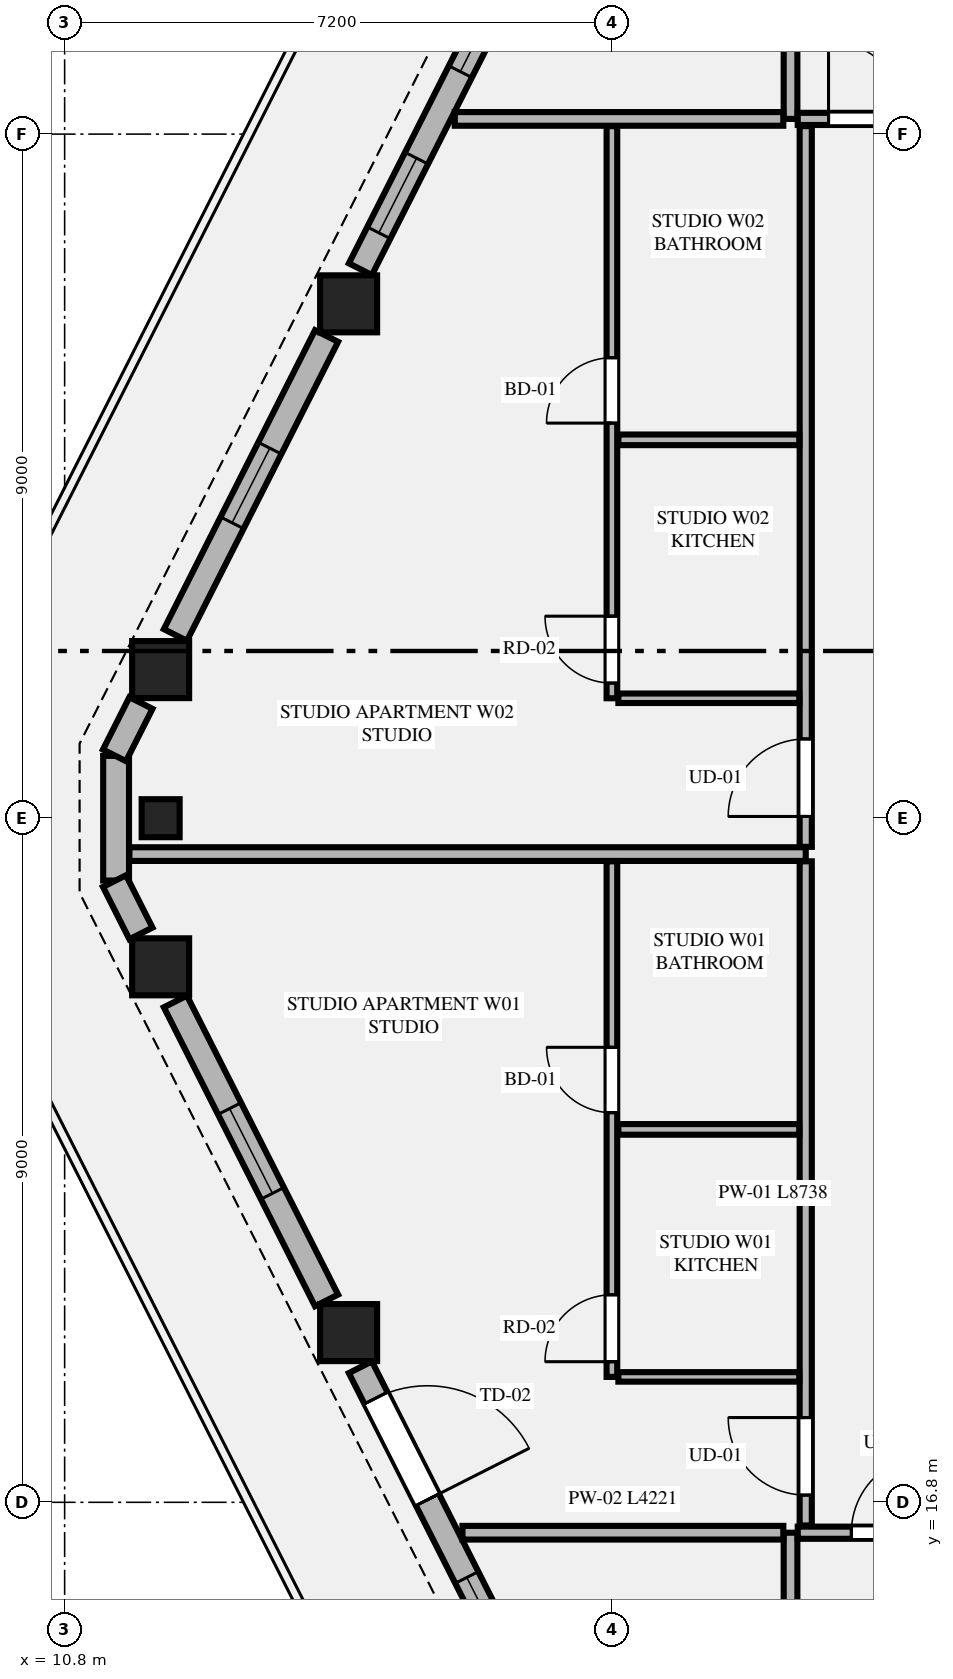
"""IFC4 building model, lengths in metres.
Left out: names, types, materials, properties, quantities, classifications, styles, units other than length and angle.
Written with IfcOpenShell. Run it as: python <this file> out.ifc"""

import sys

from ifc_helpers import new_model, si_unit, direction, frame, frame_2d, origin, origin_2d, place, context, subcontext, project, spatial, rectangle, extrude, element, fill, save


model = new_model("IFC4")
c1 = context("Model", 3, precision=1e-05, world=origin(), true_north=direction((0.0, 1.0)))
c2 = subcontext(c1, "Body", "Model", "MODEL_VIEW")
j1 = project(units=[si_unit("LENGTHUNIT", "METRE"), si_unit("PLANEANGLEUNIT", "RADIAN")], contexts=[c1])
p1 = place(None, origin())
s1 = spatial("IfcSite", under=j1, at=p1, CompositionType="ELEMENT")
p2 = place(p1, origin())
s2 = spatial("IfcBuilding", under=s1, at=p2, CompositionType="ELEMENT")
p3 = place(p2, frame((0.0, 0.0, 227.0)))
s3 = spatial("IfcBuildingStorey", under=s2, at=p3, CompositionType="ELEMENT", Elevation=227.0)
for number, where, z_axis, x_axis in (
    (1, (14.536, 32.567, 0.0), (0.0, 0.0, 1.0), (1.0, 0.0, 0.0)),
    (2, (12.063, 27.755, 0.0), (0.0, 0.0, 1.0), (1.0, 0.0, 0.0)),
    (3, (12.063, 23.845, 0.0), (0.0, 0.0, 1.0), (1.0, 0.0, 0.0)),
    (4, (14.536, 19.033, 0.0), (0.0, 0.0, 1.0), (1.0, 0.0, 0.0)),
):
    element("IfcColumn", number, at=place(p3, frame(where, z_axis=z_axis, x_axis=x_axis)), inside=s3, PredefinedType="COLUMN", context=c2, shape_type="SweptSolid", body=[
        extrude(rectangle(XDim=0.75, YDim=0.75, at=origin_2d()), origin(), (0.0, 0.0, 1.0), 3.65),
    ])
p4 = place(p3, frame((12.063, 25.8, 0.0), z_axis=(0.0, 0.0, 1.0), x_axis=(0.0, -1.0, 0.0)))
e5 = element("IfcColumn", 5, at=p4, inside=s3, PredefinedType="PILASTER", context=c2, shape_type="SweptSolid", body=[
    extrude(rectangle(XDim=0.5, YDim=0.35, at=origin_2d()), origin(), (0.0, 0.0, 1.0), 3.65),
])
p5 = place(p3, frame((11.477, 26.62, 0.0), z_axis=(0.0, 0.0, 1.0), x_axis=(0.0, -1.0, 0.0)))
e6 = element("IfcWall", 6, at=p5, inside=s3, PredefinedType="STANDARD", context=c2, shape_type="SweptSolid", body=[
    extrude(rectangle(XDim=1.64, YDim=0.34, at=frame_2d((0.82, 0.0))), origin(), (0.0, 0.0, 1.0), 3.45),
])
p6 = place(p3, frame((16.768, 37.127, 0.0), z_axis=(0.0, 0.0, 1.0), x_axis=(-0.451581819983, -0.892229712496, 0.0)))
e7 = element("IfcWall", 7, at=p6, inside=s3, PredefinedType="STANDARD", context=c2, shape_type="SweptSolid", body=[
    extrude(rectangle(XDim=4.6, YDim=0.34, at=frame_2d((2.3, 0.0))), origin(), (0.0, 0.0, 1.0), 2.983),
])
p7 = place(p6, frame((0.437, 0.0, 0.75)))
e8 = element("IfcOpeningElement", 8, at=p7, cuts=e7, PredefinedType="OPENING", context=c2, shape_type="SweptSolid", body=[
    extrude(rectangle(XDim=1.25, YDim=1.95, at=frame_2d((0.625, 0.975))), frame((0.0, 0.18, 0.0), z_axis=(0.0, -1.0, 0.0), x_axis=(1.0, 0.0, 0.0)), (0.0, 0.0, 1.0), 0.36),
])
p8 = place(p6, frame((2.963, 0.0, 0.75)))
e9 = element("IfcOpeningElement", 9, at=p8, cuts=e7, PredefinedType="OPENING", context=c2, shape_type="SweptSolid", body=[
    extrude(rectangle(XDim=1.1, YDim=2.0, at=frame_2d((0.55, 1.0))), frame((0.0, 0.18, 0.0), z_axis=(0.0, -1.0, 0.0), x_axis=(1.0, 0.0, 0.0)), (0.0, 0.0, 1.0), 0.36),
])
p9 = place(p3, frame((14.246, 32.144, 0.0), z_axis=(0.0, 0.0, 1.0), x_axis=(-0.451285866323, -0.892379441077, 0.0)))
e10 = element("IfcWall", 10, at=p9, inside=s3, PredefinedType="STANDARD", context=c2, shape_type="SweptSolid", body=[
    extrude(rectangle(XDim=4.407, YDim=0.34, at=frame_2d((2.204, 0.0))), origin(), (0.0, 0.0, 1.0), 2.983),
])
p10 = place(p9, frame((1.654, 0.0, 0.75)))
e11 = element("IfcOpeningElement", 11, at=p10, cuts=e10, PredefinedType="OPENING", context=c2, shape_type="SweptSolid", body=[
    extrude(rectangle(XDim=1.1, YDim=2.0, at=frame_2d((0.55, 1.0))), frame((0.0, 0.18, 0.0), z_axis=(0.0, -1.0, 0.0), x_axis=(1.0, 0.0, 0.0)), (0.0, 0.0, 1.0), 0.36),
])
for number, where, z_axis, x_axis in (
    (12, (11.804, 27.316, 0.0), (0.0, 0.0, 1.0), (-0.451, -0.893, 0.0)),
    (13, (11.456, 24.973, 0.0), (0.0, 0.0, 1.0), (0.451, -0.893, 0.0)),
):
    element("IfcWall", number, at=place(p3, frame(where, z_axis=z_axis, x_axis=x_axis)), inside=s3, PredefinedType="STANDARD", context=c2, shape_type="SweptSolid", body=[
        extrude(rectangle(XDim=0.772, YDim=0.34, at=frame_2d((0.386, 0.0))), origin(), (0.0, 0.0, 1.0), 3.45),
    ])
p11 = place(p3, frame((12.257, 23.389, 0.0), z_axis=(0.0, 0.0, 1.0), x_axis=(0.45130817501, -0.892368158984, 0.0)))
e14 = element("IfcWall", 14, at=p11, inside=s3, PredefinedType="STANDARD", context=c2, shape_type="SweptSolid", body=[
    extrude(rectangle(XDim=4.407, YDim=0.34, at=frame_2d((2.204, 0.0))), origin(), (0.0, 0.0, 1.0), 2.983),
])
p12 = place(p11, frame((1.579, 0.0, 0.75)))
e15 = element("IfcOpeningElement", 15, at=p12, cuts=e14, PredefinedType="OPENING", context=c2, shape_type="SweptSolid", body=[
    extrude(rectangle(XDim=1.25, YDim=1.95, at=frame_2d((0.625, 0.975))), frame((0.0, 0.18, 0.0), z_axis=(0.0, -1.0, 0.0), x_axis=(1.0, 0.0, 0.0)), (0.0, 0.0, 1.0), 0.36),
])
p13 = place(p3, frame((14.691, 18.577, 0.0), z_axis=(0.0, 0.0, 1.0), x_axis=(0.451581819983, -0.892229712496, 0.0)))
e16 = element("IfcWall", 16, at=p13, inside=s3, PredefinedType="STANDARD", context=c2, shape_type="SweptSolid", body=[
    extrude(rectangle(XDim=4.6, YDim=0.34, at=frame_2d((2.3, 0.0))), origin(), (0.0, 0.0, 1.0), 2.983),
])
p14 = place(p13, frame((0.454, 0.0, 0.0)))
e17 = element("IfcOpeningElement", 17, at=p14, cuts=e16, PredefinedType="OPENING", context=c2, shape_type="SweptSolid", body=[
    extrude(rectangle(XDim=1.5, YDim=2.3, at=frame_2d((0.75, 1.15))), frame((0.0, 0.18, 0.0), z_axis=(0.0, -1.0, 0.0), x_axis=(1.0, 0.0, 0.0)), (0.0, 0.0, 1.0), 0.36),
])
p15 = place(p13, frame((3.1, 0.0, 0.75)))
e18 = element("IfcOpeningElement", 18, at=p15, cuts=e16, PredefinedType="OPENING", context=c2, shape_type="SweptSolid", body=[
    extrude(rectangle(XDim=1.1, YDim=2.0, at=frame_2d((0.55, 1.0))), frame((0.0, 0.18, 0.0), z_axis=(0.0, -1.0, 0.0), x_axis=(1.0, 0.0, 0.0)), (0.0, 0.0, 1.0), 0.36),
])
p16 = place(p3, frame((20.35, 8.119, 0.0), z_axis=(0.0, 0.0, 1.0), x_axis=(0.0, 1.0, 0.0)))
e19 = element("IfcWall", 19, at=p16, inside=s3, PredefinedType="PARTITIONING", context=c2, shape_type="SweptSolid", body=[
    extrude(rectangle(XDim=8.281, YDim=0.18, at=frame_2d((4.141, 0.0))), origin(), (0.0, 0.0, 1.0), 3.45),
])
p17 = place(p3, frame((20.445, 16.4, 0.0), z_axis=(0.0, 0.0, 1.0), x_axis=(1.0, 0.0, 0.0)))
e20 = element("IfcWall", 20, at=p17, inside=s3, PredefinedType="PARTITIONING", context=c2, shape_type="SweptSolid", body=[
    extrude(rectangle(XDim=8.606, YDim=0.16, at=frame_2d((4.303, 0.0))), origin(), (0.0, 0.0, 1.0), 3.45),
])
p18 = place(p17, frame((0.705, 0.0, 0.0)))
e21 = element("IfcOpeningElement", 21, at=p18, cuts=e20, PredefinedType="OPENING", context=c2, shape_type="SweptSolid", body=[
    extrude(rectangle(XDim=1.02, YDim=2.25, at=frame_2d((0.51, 1.125))), frame((0.0, 0.09, 0.0), z_axis=(0.0, -1.0, 0.0), x_axis=(1.0, 0.0, 0.0)), (0.0, 0.0, 1.0), 0.18),
])
p19 = place(p3, frame((20.35, 35.0, 0.0), z_axis=(0.0, 0.0, 1.0), x_axis=(0.0, 1.0, 0.0)))
e22 = element("IfcWall", 22, at=p19, inside=s3, PredefinedType="PARTITIONING", context=c2, shape_type="SweptSolid", body=[
    extrude(rectangle(XDim=8.481, YDim=0.18, at=frame_2d((4.24, 0.0))), origin(), (0.0, 0.0, 1.0), 3.45),
])
p20 = place(p3, frame((20.445, 35.0, 0.0), z_axis=(0.0, 0.0, 1.0), x_axis=(1.0, 0.0, 0.0)))
e23 = element("IfcWall", 23, at=p20, inside=s3, PredefinedType="PARTITIONING", context=c2, shape_type="SweptSolid", body=[
    extrude(rectangle(XDim=15.114, YDim=0.16, at=frame_2d((7.557, 0.0))), origin(), (0.0, 0.0, 1.0), 3.45),
])
p21 = place(p20, frame((0.405, 0.0, 0.0)))
e24 = element("IfcOpeningElement", 24, at=p21, cuts=e23, PredefinedType="OPENING", context=c2, shape_type="SweptSolid", body=[
    extrude(rectangle(XDim=1.02, YDim=2.25, at=frame_2d((0.51, 1.125))), frame((0.0, 0.09, 0.0), z_axis=(0.0, -1.0, 0.0), x_axis=(1.0, 0.0, 0.0)), (0.0, 0.0, 1.0), 0.18),
])
p22 = place(p3, frame((16.034, 16.4, 0.0), z_axis=(0.0, 0.0, 1.0), x_axis=(1.0, 0.0, 0.0)))
e25 = element("IfcWall", 25, at=p22, inside=s3, PredefinedType="PARTITIONING", context=c2, shape_type="SweptSolid", body=[
    extrude(rectangle(XDim=4.221, YDim=0.18, at=frame_2d((2.11, 0.0))), origin(), (0.0, 0.0, 1.0), 3.45),
])
p23 = place(p3, frame((15.933, 35.0, 0.0), z_axis=(0.0, 0.0, 1.0), x_axis=(1.0, 0.0, 0.0)))
e26 = element("IfcWall", 26, at=p23, inside=s3, PredefinedType="PARTITIONING", context=c2, shape_type="SweptSolid", body=[
    extrude(rectangle(XDim=4.322, YDim=0.18, at=frame_2d((2.161, 0.0))), origin(), (0.0, 0.0, 1.0), 3.45),
])
p24 = place(p3, frame((20.55, 16.495, 0.0), z_axis=(0.0, 0.0, 1.0), x_axis=(0.0, 1.0, 0.0)))
e27 = element("IfcWall", 27, at=p24, inside=s3, PredefinedType="PARTITIONING", context=c2, shape_type="SweptSolid", body=[
    extrude(rectangle(XDim=8.738, YDim=0.16, at=frame_2d((4.369, 0.0))), origin(), (0.0, 0.0, 1.0), 3.137),
])
p25 = place(p24, frame((0.4, 0.0, 0.0)))
e28 = element("IfcOpeningElement", 28, at=p25, cuts=e27, PredefinedType="OPENING", context=c2, shape_type="SweptSolid", body=[
    extrude(rectangle(XDim=1.02, YDim=2.25, at=frame_2d((0.51, 1.125))), frame((0.0, 0.09, 0.0), z_axis=(0.0, -1.0, 0.0), x_axis=(1.0, 0.0, 0.0)), (0.0, 0.0, 1.0), 0.18),
])
p26 = place(p3, frame((18.085, 18.45, 0.0), z_axis=(0.0, 0.0, 1.0), x_axis=(1.0, 0.0, 0.0)))
e29 = element("IfcWall", 29, at=p26, inside=s3, PredefinedType="PARTITIONING", context=c2, shape_type="SweptSolid", body=[
    extrude(rectangle(XDim=2.38, YDim=0.125, at=frame_2d((1.19, 0.0))), origin(), (0.0, 0.0, 1.0), 3.45),
])
p27 = place(p3, frame((18.0, 18.45, 0.0), z_axis=(0.0, 0.0, 1.0), x_axis=(0.0, 1.0, 0.0)))
e30 = element("IfcWall", 30, at=p27, inside=s3, PredefinedType="PLUMBINGWALL", context=c2, shape_type="SweptSolid", body=[
    extrude(rectangle(XDim=6.783, YDim=0.14, at=frame_2d((3.392, 0.0))), origin(), (0.0, 0.0, 1.0), 3.45),
])
p28 = place(p27, frame((3.476, 0.0, 0.0)))
e31 = element("IfcOpeningElement", 31, at=p28, cuts=e30, PredefinedType="OPENING", context=c2, shape_type="SweptSolid", body=[
    extrude(rectangle(XDim=0.86, YDim=2.1, at=frame_2d((0.43, 1.05))), frame((0.0, 0.08, 0.0), z_axis=(0.0, -1.0, 0.0), x_axis=(1.0, 0.0, 0.0)), (0.0, 0.0, 1.0), 0.16),
])
p29 = place(p27, frame((0.2, 0.0, 0.0)))
e32 = element("IfcOpeningElement", 32, at=p29, cuts=e30, PredefinedType="OPENING", context=c2, shape_type="SweptSolid", body=[
    extrude(rectangle(XDim=0.88, YDim=2.15, at=frame_2d((0.44, 1.075))), frame((0.0, 0.08, 0.0), z_axis=(0.0, -1.0, 0.0), x_axis=(1.0, 0.0, 0.0)), (0.0, 0.0, 1.0), 0.16),
])
p30 = place(p3, frame((18.085, 21.706, 0.0), z_axis=(0.0, 0.0, 1.0), x_axis=(1.0, 0.0, 0.0)))
e33 = element("IfcWall", 33, at=p30, inside=s3, PredefinedType="PLUMBINGWALL", context=c2, shape_type="SweptSolid", body=[
    extrude(rectangle(XDim=2.38, YDim=0.14, at=frame_2d((1.19, 0.0))), origin(), (0.0, 0.0, 1.0), 3.45),
])
p31 = place(p3, frame((11.652, 25.328, 0.0), z_axis=(0.0, 0.0, 1.0), x_axis=(1.0, 0.0, 0.0)))
e34 = element("IfcWall", 34, at=p31, inside=s3, PredefinedType="PARTITIONING", context=c2, shape_type="SweptSolid", body=[
    extrude(rectangle(XDim=8.898, YDim=0.18, at=frame_2d((4.449, 0.0))), origin(), (0.0, 0.0, 1.0), 3.45),
])
p32 = place(p3, frame((20.55, 25.423, 0.0), z_axis=(0.0, 0.0, 1.0), x_axis=(0.0, 1.0, 0.0)))
e35 = element("IfcWall", 35, at=p32, inside=s3, PredefinedType="PARTITIONING", context=c2, shape_type="SweptSolid", body=[
    extrude(rectangle(XDim=9.482, YDim=0.16, at=frame_2d((4.741, 0.0))), origin(), (0.0, 0.0, 1.0), 3.137),
])
p33 = place(p32, frame((0.4, 0.0, 0.0)))
e36 = element("IfcOpeningElement", 36, at=p33, cuts=e35, PredefinedType="OPENING", context=c2, shape_type="SweptSolid", body=[
    extrude(rectangle(XDim=1.02, YDim=2.25, at=frame_2d((0.51, 1.125))), frame((0.0, 0.09, 0.0), z_axis=(0.0, -1.0, 0.0), x_axis=(1.0, 0.0, 0.0)), (0.0, 0.0, 1.0), 0.18),
])
p34 = place(p3, frame((18.085, 27.378, 0.0), z_axis=(0.0, 0.0, 1.0), x_axis=(1.0, 0.0, 0.0)))
e37 = element("IfcWall", 37, at=p34, inside=s3, PredefinedType="PARTITIONING", context=c2, shape_type="SweptSolid", body=[
    extrude(rectangle(XDim=2.38, YDim=0.125, at=frame_2d((1.19, 0.0))), origin(), (0.0, 0.0, 1.0), 3.45),
])
p35 = place(p3, frame((18.0, 27.378, 0.0), z_axis=(0.0, 0.0, 1.0), x_axis=(0.0, 1.0, 0.0)))
e38 = element("IfcWall", 38, at=p35, inside=s3, PredefinedType="PLUMBINGWALL", context=c2, shape_type="SweptSolid", body=[
    extrude(rectangle(XDim=7.527, YDim=0.14, at=frame_2d((3.764, 0.0))), origin(), (0.0, 0.0, 1.0), 3.45),
])
p36 = place(p35, frame((3.62, 0.0, 0.0)))
e39 = element("IfcOpeningElement", 39, at=p36, cuts=e38, PredefinedType="OPENING", context=c2, shape_type="SweptSolid", body=[
    extrude(rectangle(XDim=0.86, YDim=2.1, at=frame_2d((0.43, 1.05))), frame((0.0, 0.08, 0.0), z_axis=(0.0, -1.0, 0.0), x_axis=(1.0, 0.0, 0.0)), (0.0, 0.0, 1.0), 0.16),
])
p37 = place(p35, frame((0.2, 0.0, 0.0)))
e40 = element("IfcOpeningElement", 40, at=p37, cuts=e38, PredefinedType="OPENING", context=c2, shape_type="SweptSolid", body=[
    extrude(rectangle(XDim=0.88, YDim=2.15, at=frame_2d((0.44, 1.075))), frame((0.0, 0.08, 0.0), z_axis=(0.0, -1.0, 0.0), x_axis=(1.0, 0.0, 0.0)), (0.0, 0.0, 1.0), 0.16),
])
p38 = place(p3, frame((18.085, 30.778, 0.0), z_axis=(0.0, 0.0, 1.0), x_axis=(1.0, 0.0, 0.0)))
e41 = element("IfcWall", 41, at=p38, inside=s3, PredefinedType="PLUMBINGWALL", context=c2, shape_type="SweptSolid", body=[
    extrude(rectangle(XDim=2.38, YDim=0.14, at=frame_2d((1.19, 0.0))), origin(), (0.0, 0.0, 1.0), 3.45),
])
p39 = place(p7, origin())
e42 = element("IfcWindow", 42, at=p39, inside=s3, PartitioningType="SINGLE_PANEL", PredefinedType="WINDOW", context=c2, shape_type="SweptSolid", body=[
    extrude(rectangle(XDim=1.25, YDim=1.95, at=frame_2d((0.625, 0.975))), frame((0.0, 0.03, 0.0), z_axis=(0.0, -1.0, 0.0), x_axis=(1.0, 0.0, 0.0)), (0.0, 0.0, 1.0), 0.06),
])
fill(e8, e42)
p40 = place(p10, origin())
e43 = element("IfcWindow", 43, at=p40, inside=s3, PartitioningType="SINGLE_PANEL", PredefinedType="WINDOW", context=c2, shape_type="SweptSolid", body=[
    extrude(rectangle(XDim=1.1, YDim=2.0, at=frame_2d((0.55, 1.0))), frame((0.0, 0.03, 0.0), z_axis=(0.0, -1.0, 0.0), x_axis=(1.0, 0.0, 0.0)), (0.0, 0.0, 1.0), 0.06),
])
fill(e11, e43)
p41 = place(p12, origin())
e44 = element("IfcWindow", 44, at=p41, inside=s3, PartitioningType="SINGLE_PANEL", PredefinedType="WINDOW", context=c2, shape_type="SweptSolid", body=[
    extrude(rectangle(XDim=1.25, YDim=1.95, at=frame_2d((0.625, 0.975))), frame((0.0, 0.03, 0.0), z_axis=(0.0, -1.0, 0.0), x_axis=(1.0, 0.0, 0.0)), (0.0, 0.0, 1.0), 0.06),
])
fill(e15, e44)
p42 = place(p14, origin())
e45 = element("IfcDoor", 45, at=p42, inside=s3, OperationType="SINGLE_SWING_RIGHT", PredefinedType="DOOR", context=c2, shape_type="SweptSolid", body=[
    extrude(rectangle(XDim=1.5, YDim=2.3, at=frame_2d((0.75, 1.15))), frame((0.0, 0.025, 0.0), z_axis=(0.0, -1.0, 0.0), x_axis=(1.0, 0.0, 0.0)), (0.0, 0.0, 1.0), 0.05),
])
fill(e17, e45)
p43 = place(p18, origin())
e46 = element("IfcDoor", 46, at=p43, inside=s3, OperationType="SINGLE_SWING_RIGHT", PredefinedType="DOOR", context=c2, shape_type="SweptSolid", body=[
    extrude(rectangle(XDim=1.02, YDim=2.25, at=frame_2d((0.51, 1.125))), frame((0.0, 0.025, 0.0), z_axis=(0.0, -1.0, 0.0), x_axis=(1.0, 0.0, 0.0)), (0.0, 0.0, 1.0), 0.05),
])
fill(e21, e46)
p44 = place(p21, origin())
e47 = element("IfcDoor", 47, at=p44, inside=s3, OperationType="SINGLE_SWING_LEFT", PredefinedType="DOOR", context=c2, shape_type="SweptSolid", body=[
    extrude(rectangle(XDim=1.02, YDim=2.25, at=frame_2d((0.51, 1.125))), frame((0.0, 0.025, 0.0), z_axis=(0.0, -1.0, 0.0), x_axis=(1.0, 0.0, 0.0)), (0.0, 0.0, 1.0), 0.05),
])
fill(e24, e47)
p45 = place(p28, origin())
e48 = element("IfcDoor", 48, at=p45, inside=s3, OperationType="SINGLE_SWING_RIGHT", PredefinedType="DOOR", context=c2, shape_type="SweptSolid", body=[
    extrude(rectangle(XDim=0.86, YDim=2.1, at=frame_2d((0.43, 1.05))), frame((0.0, 0.025, 0.0), z_axis=(0.0, -1.0, 0.0), x_axis=(1.0, 0.0, 0.0)), (0.0, 0.0, 1.0), 0.05),
])
fill(e31, e48)
p46 = place(p25, origin())
e49 = element("IfcDoor", 49, at=p46, inside=s3, OperationType="SINGLE_SWING_RIGHT", PredefinedType="DOOR", context=c2, shape_type="SweptSolid", body=[
    extrude(rectangle(XDim=1.02, YDim=2.25, at=frame_2d((0.51, 1.125))), frame((0.0, 0.025, 0.0), z_axis=(0.0, -1.0, 0.0), x_axis=(1.0, 0.0, 0.0)), (0.0, 0.0, 1.0), 0.05),
])
fill(e28, e49)
p47 = place(p29, origin())
e50 = element("IfcDoor", 50, at=p47, inside=s3, OperationType="SINGLE_SWING_LEFT", PredefinedType="DOOR", context=c2, shape_type="SweptSolid", body=[
    extrude(rectangle(XDim=0.88, YDim=2.15, at=frame_2d((0.44, 1.075))), frame((0.0, 0.025, 0.0), z_axis=(0.0, -1.0, 0.0), x_axis=(1.0, 0.0, 0.0)), (0.0, 0.0, 1.0), 0.05),
])
fill(e32, e50)
p48 = place(p36, origin())
e51 = element("IfcDoor", 51, at=p48, inside=s3, OperationType="SINGLE_SWING_LEFT", PredefinedType="DOOR", context=c2, shape_type="SweptSolid", body=[
    extrude(rectangle(XDim=0.86, YDim=2.1, at=frame_2d((0.43, 1.05))), frame((0.0, 0.025, 0.0), z_axis=(0.0, -1.0, 0.0), x_axis=(1.0, 0.0, 0.0)), (0.0, 0.0, 1.0), 0.05),
])
fill(e39, e51)
p49 = place(p33, origin())
e52 = element("IfcDoor", 52, at=p49, inside=s3, OperationType="SINGLE_SWING_LEFT", PredefinedType="DOOR", context=c2, shape_type="SweptSolid", body=[
    extrude(rectangle(XDim=1.02, YDim=2.25, at=frame_2d((0.51, 1.125))), frame((0.0, 0.025, 0.0), z_axis=(0.0, -1.0, 0.0), x_axis=(1.0, 0.0, 0.0)), (0.0, 0.0, 1.0), 0.05),
])
fill(e36, e52)
p50 = place(p37, origin())
e53 = element("IfcDoor", 53, at=p50, inside=s3, OperationType="SINGLE_SWING_RIGHT", PredefinedType="DOOR", context=c2, shape_type="SweptSolid", body=[
    extrude(rectangle(XDim=0.88, YDim=2.15, at=frame_2d((0.44, 1.075))), frame((0.0, 0.025, 0.0), z_axis=(0.0, -1.0, 0.0), x_axis=(1.0, 0.0, 0.0)), (0.0, 0.0, 1.0), 0.05),
])
fill(e40, e53)
p51 = place(p8, origin())
e54 = element("IfcWindow", 54, at=p51, inside=s3, PartitioningType="SINGLE_PANEL", PredefinedType="WINDOW", context=c2, shape_type="SweptSolid", body=[
    extrude(rectangle(XDim=1.1, YDim=2.0, at=frame_2d((0.55, 1.0))), frame((0.0, 0.03, 0.0), z_axis=(0.0, -1.0, 0.0), x_axis=(1.0, 0.0, 0.0)), (0.0, 0.0, 1.0), 0.06),
])
fill(e9, e54)
p52 = place(p15, origin())
e55 = element("IfcWindow", 55, at=p52, inside=s3, PartitioningType="SINGLE_PANEL", PredefinedType="WINDOW", context=c2, shape_type="SweptSolid", body=[
    extrude(rectangle(XDim=1.1, YDim=2.0, at=frame_2d((0.55, 1.0))), frame((0.0, 0.03, 0.0), z_axis=(0.0, -1.0, 0.0), x_axis=(1.0, 0.0, 0.0)), (0.0, 0.0, 1.0), 0.06),
])
fill(e18, e55)
save(model, sys.argv[1])
